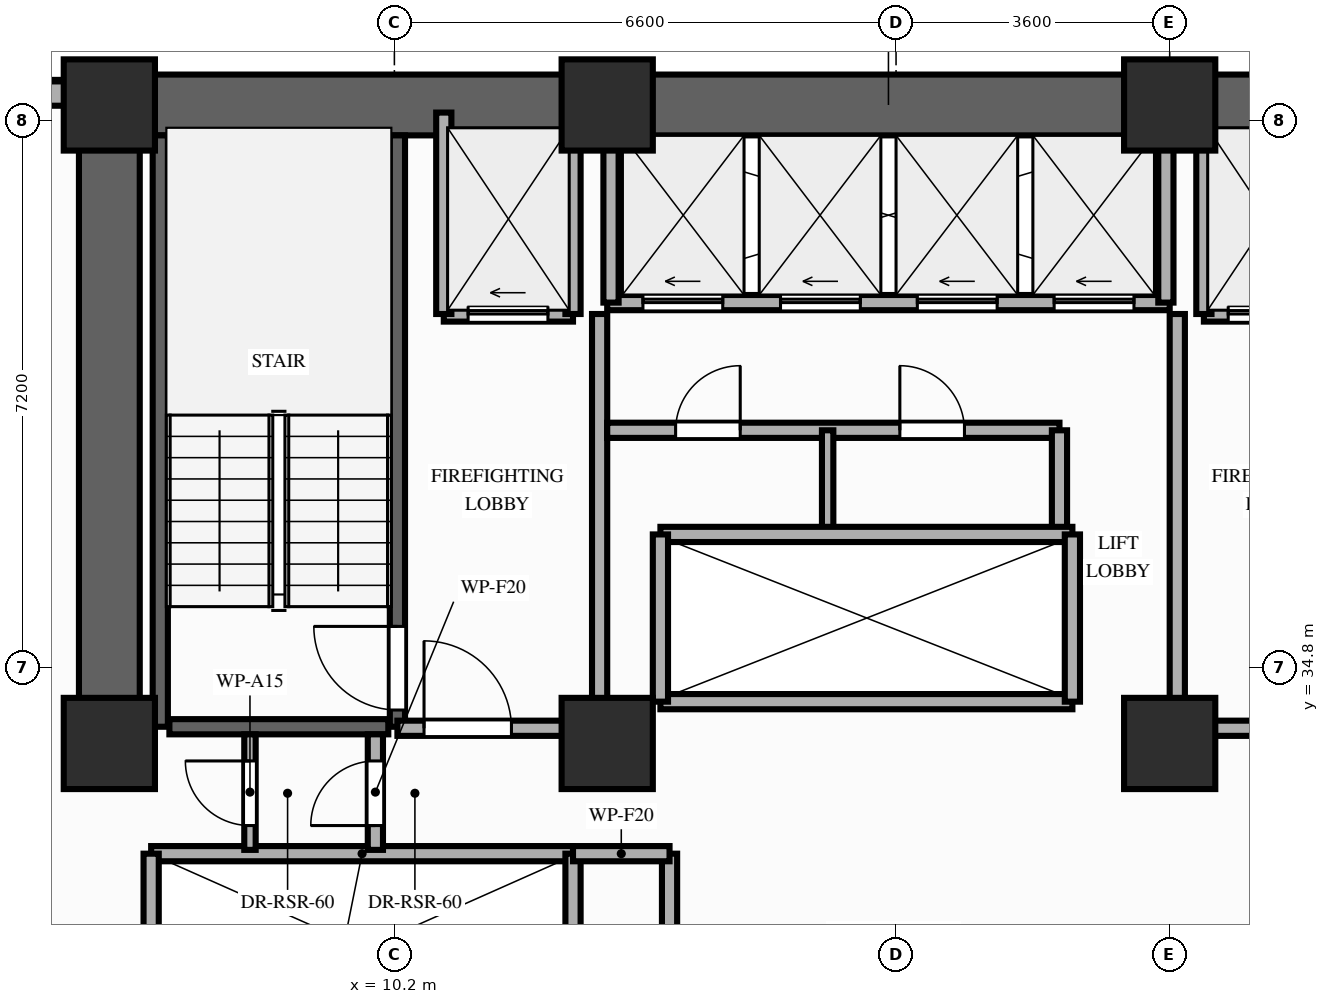
"""IFC4 building model, lengths in metres.
Left out: names, types, materials, properties, quantities, classifications, styles, units other than length and angle.
Written with IfcOpenShell. Run it as: python <this file> out.ifc"""

import sys

from ifc_helpers import new_model, si_unit, direction, frame, frame_2d, origin, origin_2d, place, context, subcontext, project, spatial, rectangle, extrude, element, fill, save


model = new_model("IFC4")
c1 = context("Model", 3, precision=1e-05, world=origin(), true_north=direction((0.0, 1.0)))
c2 = subcontext(c1, "Body", "Model", "MODEL_VIEW")
j1 = project(units=[si_unit("LENGTHUNIT", "METRE"), si_unit("PLANEANGLEUNIT", "RADIAN")], contexts=[c1])
p1 = place(None, origin())
s1 = spatial("IfcSite", under=j1, at=p1, CompositionType="ELEMENT")
p2 = place(p1, origin())
s2 = spatial("IfcBuilding", under=s1, at=p2, CompositionType="ELEMENT")
p3 = place(p2, frame((0.0, 0.0, 72.4)))
s3 = spatial("IfcBuildingStorey", under=s2, at=p3, CompositionType="ELEMENT", Elevation=72.4)
for number, where, z_axis, x_axis in (
    (1, (6.45, 33.8, 0.0), (0.0, 0.0, 1.0), (1.0, 0.0, 0.0)),
    (2, (13.0, 33.8, 0.0), (0.0, 0.0, 1.0), (1.0, 0.0, 0.0)),
    (3, (20.4, 33.8, 0.0), (0.0, 0.0, 1.0), (1.0, 0.0, 0.0)),
    (4, (6.45, 42.2, 0.0), (0.0, 0.0, 1.0), (1.0, 0.0, 0.0)),
    (5, (13.0, 42.2, 0.0), (0.0, 0.0, 1.0), (1.0, 0.0, 0.0)),
    (6, (20.4, 42.2, 0.0), (0.0, 0.0, 1.0), (1.0, 0.0, 0.0)),
):
    element("IfcColumn", number, at=place(p3, frame(where, z_axis=z_axis, x_axis=x_axis)), inside=s3, PredefinedType="COLUMN", context=c2, shape_type="SweptSolid", body=[
        extrude(rectangle(XDim=1.2, YDim=1.2, at=origin_2d()), origin(), (0.0, 0.0, 1.0), 3.2),
    ])
p4 = place(p3, frame((6.0, 42.35, 0.0), z_axis=(0.0, 0.0, 1.0), x_axis=(-1.0, 0.0, 0.0)))
e7 = element("IfcWall", 7, at=p4, inside=s3, PredefinedType="STANDARD", context=c2, shape_type="SweptSolid", body=[
    extrude(rectangle(XDim=2.0, YDim=0.32, at=frame_2d((1.0, 0.0))), origin(), (0.0, 0.0, 1.0), 2.96),
])
p5 = place(p3, frame((6.45, 42.2, 0.0), z_axis=(0.0, 0.0, 1.0), x_axis=(1.0, 0.0, 0.0)))
e8 = element("IfcWall", 8, at=p5, inside=s3, PredefinedType="SHEAR", context=c2, shape_type="SweptSolid", body=[
    extrude(rectangle(XDim=20.45, YDim=0.8, at=frame_2d((10.225, 0.0))), origin(), (0.0, 0.0, 1.0), 2.96),
])
p6 = place(p3, frame((6.45, 33.8, 0.0), z_axis=(0.0, 0.0, 1.0), x_axis=(0.0, 1.0, 0.0)))
e9 = element("IfcWall", 9, at=p6, inside=s3, PredefinedType="SHEAR", context=c2, shape_type="SweptSolid", body=[
    extrude(rectangle(XDim=7.95, YDim=0.8, at=frame_2d((3.975, 0.0))), origin(), (0.0, 0.0, 1.0), 2.96),
])
p7 = place(p3, frame((7.12, 34.02, 0.0), z_axis=(0.0, 0.0, 1.0), x_axis=(0.0, 1.0, 0.0)))
e10 = element("IfcWall", 10, at=p7, inside=s3, PredefinedType="SHEAR", context=c2, shape_type="SweptSolid", body=[
    extrude(rectangle(XDim=7.78, YDim=0.2, at=frame_2d((3.89, 0.0))), origin(), (0.0, 0.0, 1.0), 2.96),
])
p8 = place(p3, frame((10.24, 34.02, 0.0), z_axis=(0.0, 0.0, 1.0), x_axis=(0.0, 1.0, 0.0)))
e11 = element("IfcWall", 11, at=p8, inside=s3, PredefinedType="SHEAR", context=c2, shape_type="SweptSolid", body=[
    extrude(rectangle(XDim=7.78, YDim=0.2, at=frame_2d((3.89, 0.0))), origin(), (0.0, 0.0, 1.0), 2.96),
])
p9 = place(p8, frame((0.22, 0.0, 0.0)))
e12 = element("IfcOpeningElement", 12, at=p9, cuts=e11, PredefinedType="OPENING", context=c2, shape_type="SweptSolid", body=[
    extrude(rectangle(XDim=1.1, YDim=2.15, at=frame_2d((0.55, 1.075))), frame((0.0, 0.11, 0.0), z_axis=(0.0, -1.0, 0.0), x_axis=(1.0, 0.0, 0.0)), (0.0, 0.0, 1.0), 0.22),
])
p10 = place(p3, frame((7.24, 34.02, 0.0), z_axis=(0.0, 0.0, 1.0), x_axis=(1.0, 0.0, 0.0)))
e13 = element("IfcWall", 13, at=p10, inside=s3, PredefinedType="SHEAR", context=c2, shape_type="SweptSolid", body=[
    extrude(rectangle(XDim=2.88, YDim=0.2, at=frame_2d((1.44, 0.0))), origin(), (0.0, 0.0, 1.0), 2.96),
])
p11 = place(p3, frame((7.0, 32.35, 0.0), z_axis=(0.0, 0.0, 1.0), x_axis=(1.0, 0.0, 0.0)))
e14 = element("IfcWall", 14, at=p11, inside=s3, PredefinedType="MOVABLE", context=c2, shape_type="SweptSolid", body=[
    extrude(rectangle(XDim=5.55, YDim=0.2, at=frame_2d((2.775, 0.0))), origin(), (0.0, 0.0, 1.0), 2.96),
])
for number, where, z_axis, x_axis in (
    (15, (7.0, 29.85, 0.0), (0.0, 0.0, 1.0), (0.0, 1.0, 0.0)),
    (16, (12.55, 29.85, 0.0), (0.0, 0.0, 1.0), (0.0, 1.0, 0.0)),
):
    element("IfcWall", number, at=place(p3, frame(where, z_axis=z_axis, x_axis=x_axis)), inside=s3, PredefinedType="MOVABLE", context=c2, shape_type="SweptSolid", body=[
        extrude(rectangle(XDim=2.5, YDim=0.2, at=frame_2d((1.25, 0.0))), origin(), (0.0, 0.0, 1.0), 2.96),
    ])
p12 = place(p3, frame((10.85, 39.45, 0.0), z_axis=(0.0, 0.0, 1.0), x_axis=(1.0, 0.0, 0.0)))
e17 = element("IfcWall", 17, at=p12, inside=s3, PredefinedType="MOVABLE", context=c2, shape_type="SweptSolid", body=[
    extrude(rectangle(XDim=1.7, YDim=0.2, at=frame_2d((0.85, 0.0))), origin(), (0.0, 0.0, 1.0), 2.96),
])
p13 = place(p12, frame((0.32, 0.0, 0.0)))
e18 = element("IfcOpeningElement", 18, at=p13, cuts=e17, PredefinedType="OPENING", context=c2, shape_type="SweptSolid", body=[
    extrude(rectangle(XDim=1.05, YDim=2.15, at=frame_2d((0.525, 1.075))), frame((0.0, 0.11, 0.0), z_axis=(0.0, -1.0, 0.0), x_axis=(1.0, 0.0, 0.0)), (0.0, 0.0, 1.0), 0.22),
])
p14 = place(p3, frame((20.85, 39.45, 0.0), z_axis=(0.0, 0.0, 1.0), x_axis=(1.0, 0.0, 0.0)))
e19 = element("IfcWall", 19, at=p14, inside=s3, PredefinedType="MOVABLE", context=c2, shape_type="SweptSolid", body=[
    extrude(rectangle(XDim=1.7, YDim=0.2, at=frame_2d((0.85, 0.0))), origin(), (0.0, 0.0, 1.0), 2.96),
])
p15 = place(p14, frame((0.32, 0.0, 0.0)))
e20 = element("IfcOpeningElement", 20, at=p15, cuts=e19, PredefinedType="OPENING", context=c2, shape_type="SweptSolid", body=[
    extrude(rectangle(XDim=1.05, YDim=2.15, at=frame_2d((0.525, 1.075))), frame((0.0, 0.11, 0.0), z_axis=(0.0, -1.0, 0.0), x_axis=(1.0, 0.0, 0.0)), (0.0, 0.0, 1.0), 0.22),
])
for number, where, z_axis, x_axis in (
    (21, (10.85, 39.45, 0.0), (0.0, 0.0, 1.0), (0.0, 1.0, 0.0)),
    (22, (12.55, 39.45, 0.0), (0.0, 0.0, 1.0), (0.0, 1.0, 0.0)),
):
    element("IfcWall", number, at=place(p3, frame(where, z_axis=z_axis, x_axis=x_axis)), inside=s3, PredefinedType="MOVABLE", context=c2, shape_type="SweptSolid", body=[
        extrude(rectangle(XDim=2.65, YDim=0.2, at=frame_2d((1.325, 0.0))), origin(), (0.0, 0.0, 1.0), 2.35),
    ])
p16 = place(p3, frame((12.9, 34.0, 0.0), z_axis=(0.0, 0.0, 1.0), x_axis=(0.0, 1.0, 0.0)))
e23 = element("IfcWall", 23, at=p16, inside=s3, PredefinedType="PARTITIONING", context=c2, shape_type="SweptSolid", body=[
    extrude(rectangle(XDim=5.45, YDim=0.2, at=frame_2d((2.725, 0.0))), origin(), (0.0, 0.0, 1.0), 2.35),
])
p17 = place(p3, frame((10.24, 34.0, 0.0), z_axis=(0.0, 0.0, 1.0), x_axis=(1.0, 0.0, 0.0)))
e24 = element("IfcWall", 24, at=p17, inside=s3, PredefinedType="PARTITIONING", context=c2, shape_type="SweptSolid", body=[
    extrude(rectangle(XDim=2.66, YDim=0.2, at=frame_2d((1.33, 0.0))), origin(), (0.0, 0.0, 1.0), 2.35),
])
p18 = place(p17, frame((0.35, 0.0, 0.0)))
e25 = element("IfcOpeningElement", 25, at=p18, cuts=e24, PredefinedType="OPENING", context=c2, shape_type="SweptSolid", body=[
    extrude(rectangle(XDim=1.15, YDim=2.15, at=frame_2d((0.575, 1.075))), frame((0.0, 0.11, 0.0), z_axis=(0.0, -1.0, 0.0), x_axis=(1.0, 0.0, 0.0)), (0.0, 0.0, 1.0), 0.22),
])
p19 = place(p3, frame((20.85, 39.45, 0.0), z_axis=(0.0, 0.0, 1.0), x_axis=(0.0, 1.0, 0.0)))
e26 = element("IfcWall", 26, at=p19, inside=s3, PredefinedType="MOVABLE", context=c2, shape_type="SweptSolid", body=[
    extrude(rectangle(XDim=2.65, YDim=0.2, at=frame_2d((1.325, 0.0))), origin(), (0.0, 0.0, 1.0), 2.35),
])
p20 = place(p3, frame((20.5, 34.0, 0.0), z_axis=(0.0, 0.0, 1.0), x_axis=(0.0, 1.0, 0.0)))
e27 = element("IfcWall", 27, at=p20, inside=s3, PredefinedType="PARTITIONING", context=c2, shape_type="SweptSolid", body=[
    extrude(rectangle(XDim=5.45, YDim=0.2, at=frame_2d((2.725, 0.0))), origin(), (0.0, 0.0, 1.0), 2.35),
])
p21 = place(p3, frame((20.5, 34.0, 0.0), z_axis=(0.0, 0.0, 1.0), x_axis=(1.0, 0.0, 0.0)))
e28 = element("IfcWall", 28, at=p21, inside=s3, PredefinedType="PARTITIONING", context=c2, shape_type="SweptSolid", body=[
    extrude(rectangle(XDim=2.6, YDim=0.2, at=frame_2d((1.3, 0.0))), origin(), (0.0, 0.0, 1.0), 2.35),
])
p22 = place(p21, frame((1.05, 0.0, 0.0)))
e29 = element("IfcOpeningElement", 29, at=p22, cuts=e28, PredefinedType="OPENING", context=c2, shape_type="SweptSolid", body=[
    extrude(rectangle(XDim=1.15, YDim=2.15, at=frame_2d((0.575, 1.075))), frame((0.0, 0.11, 0.0), z_axis=(0.0, -1.0, 0.0), x_axis=(1.0, 0.0, 0.0)), (0.0, 0.0, 1.0), 0.22),
])
p23 = place(p3, frame((9.95, 32.4, 0.0), z_axis=(0.0, 0.0, 1.0), x_axis=(0.0, 1.0, 0.0)))
e30 = element("IfcWall", 30, at=p23, inside=s3, PredefinedType="PARTITIONING", context=c2, shape_type="SweptSolid", body=[
    extrude(rectangle(XDim=1.52, YDim=0.2, at=frame_2d((0.76, 0.0))), origin(), (0.0, 0.0, 1.0), 2.35),
])
p24 = place(p23, frame((0.32, 0.0, 0.0)))
e31 = element("IfcOpeningElement", 31, at=p24, cuts=e30, PredefinedType="OPENING", context=c2, shape_type="SweptSolid", body=[
    extrude(rectangle(XDim=0.85, YDim=2.05, at=frame_2d((0.425, 1.025))), frame((0.0, 0.11, 0.0), z_axis=(0.0, -1.0, 0.0), x_axis=(1.0, 0.0, 0.0)), (0.0, 0.0, 1.0), 0.22),
])
p25 = place(p3, frame((8.3, 32.4, 0.0), z_axis=(0.0, 0.0, 1.0), x_axis=(0.0, 1.0, 0.0)))
e32 = element("IfcWall", 32, at=p25, inside=s3, PredefinedType="PARTITIONING", context=c2, shape_type="SweptSolid", body=[
    extrude(rectangle(XDim=1.52, YDim=0.15, at=frame_2d((0.76, 0.0))), origin(), (0.0, 0.0, 1.0), 2.35),
])
p26 = place(p25, frame((0.32, 0.0, 0.0)))
e33 = element("IfcOpeningElement", 33, at=p26, cuts=e32, PredefinedType="OPENING", context=c2, shape_type="SweptSolid", body=[
    extrude(rectangle(XDim=0.85, YDim=2.05, at=frame_2d((0.425, 1.025))), frame((0.0, 0.085, 0.0), z_axis=(0.0, -1.0, 0.0), x_axis=(1.0, 0.0, 0.0)), (0.0, 0.0, 1.0), 0.17),
])
p27 = place(p3, frame((13.82, 29.85, 0.0), z_axis=(0.0, 0.0, 1.0), x_axis=(0.0, 1.0, 0.0)))
e34 = element("IfcWall", 34, at=p27, inside=s3, PredefinedType="PARTITIONING", context=c2, shape_type="SweptSolid", body=[
    extrude(rectangle(XDim=2.5, YDim=0.2, at=frame_2d((1.25, 0.0))), origin(), (0.0, 0.0, 1.0), 2.96),
])
p28 = place(p3, frame((12.55, 32.35, 0.0), z_axis=(0.0, 0.0, 1.0), x_axis=(1.0, 0.0, 0.0)))
e35 = element("IfcWall", 35, at=p28, inside=s3, PredefinedType="PARTITIONING", context=c2, shape_type="SweptSolid", body=[
    extrude(rectangle(XDim=1.27, YDim=0.2, at=frame_2d((0.635, 0.0))), origin(), (0.0, 0.0, 1.0), 2.96),
])
p29 = place(p3, frame((13.0, 39.6, 0.0), z_axis=(0.0, 0.0, 1.0), x_axis=(1.0, 0.0, 0.0)))
e36 = element("IfcWall", 36, at=p29, inside=s3, PredefinedType="MOVABLE", context=c2, shape_type="SweptSolid", body=[
    extrude(rectangle(XDim=7.4, YDim=0.2, at=frame_2d((3.7, 0.0))), origin(), (0.0, 0.0, 1.0), 2.96),
])
p30 = place(p29, frame((0.47, 0.0, 0.0)))
e37 = element("IfcOpeningElement", 37, at=p30, cuts=e36, PredefinedType="OPENING", context=c2, shape_type="SweptSolid", body=[
    extrude(rectangle(XDim=1.05, YDim=2.15, at=frame_2d((0.525, 1.075))), frame((0.0, 0.11, 0.0), z_axis=(0.0, -1.0, 0.0), x_axis=(1.0, 0.0, 0.0)), (0.0, 0.0, 1.0), 0.22),
])
p31 = place(p29, frame((2.28, 0.0, 0.0)))
e38 = element("IfcOpeningElement", 38, at=p31, cuts=e36, PredefinedType="OPENING", context=c2, shape_type="SweptSolid", body=[
    extrude(rectangle(XDim=1.05, YDim=2.15, at=frame_2d((0.525, 1.075))), frame((0.0, 0.11, 0.0), z_axis=(0.0, -1.0, 0.0), x_axis=(1.0, 0.0, 0.0)), (0.0, 0.0, 1.0), 0.22),
])
p32 = place(p29, frame((4.08, 0.0, 0.0)))
e39 = element("IfcOpeningElement", 39, at=p32, cuts=e36, PredefinedType="OPENING", context=c2, shape_type="SweptSolid", body=[
    extrude(rectangle(XDim=1.05, YDim=2.15, at=frame_2d((0.525, 1.075))), frame((0.0, 0.11, 0.0), z_axis=(0.0, -1.0, 0.0), x_axis=(1.0, 0.0, 0.0)), (0.0, 0.0, 1.0), 0.22),
])
p33 = place(p29, frame((5.88, 0.0, 0.0)))
e40 = element("IfcOpeningElement", 40, at=p33, cuts=e36, PredefinedType="OPENING", context=c2, shape_type="SweptSolid", body=[
    extrude(rectangle(XDim=1.05, YDim=2.15, at=frame_2d((0.525, 1.075))), frame((0.0, 0.11, 0.0), z_axis=(0.0, -1.0, 0.0), x_axis=(1.0, 0.0, 0.0)), (0.0, 0.0, 1.0), 0.22),
])
for number, where, z_axis, x_axis in (
    (41, (13.05, 39.6, 0.0), (0.0, 0.0, 1.0), (0.0, 1.0, 0.0)),
    (42, (20.35, 39.6, 0.0), (0.0, 0.0, 1.0), (0.0, 1.0, 0.0)),
):
    element("IfcWall", number, at=place(p3, frame(where, z_axis=z_axis, x_axis=x_axis)), inside=s3, PredefinedType="MOVABLE", context=c2, shape_type="SweptSolid", body=[
        extrude(rectangle(XDim=2.18, YDim=0.2, at=frame_2d((1.09, 0.0))), origin(), (0.0, 0.0, 1.0), 2.96),
    ])
p34 = place(p3, frame((13.0, 37.92, 0.0), z_axis=(0.0, 0.0, 1.0), x_axis=(1.0, 0.0, 0.0)))
e43 = element("IfcWall", 43, at=p34, inside=s3, PredefinedType="PARTITIONING", context=c2, shape_type="SweptSolid", body=[
    extrude(rectangle(XDim=5.95, YDim=0.2, at=frame_2d((2.975, 0.0))), origin(), (0.0, 0.0, 1.0), 2.96),
])
p35 = place(p34, frame((0.9, 0.0, 0.0)))
e44 = element("IfcOpeningElement", 44, at=p35, cuts=e43, PredefinedType="OPENING", context=c2, shape_type="SweptSolid", body=[
    extrude(rectangle(XDim=0.85, YDim=2.05, at=frame_2d((0.425, 1.025))), frame((0.0, 0.11, 0.0), z_axis=(0.0, -1.0, 0.0), x_axis=(1.0, 0.0, 0.0)), (0.0, 0.0, 1.0), 0.22),
])
p36 = place(p34, frame((3.85, 0.0, 0.0)))
e45 = element("IfcOpeningElement", 45, at=p36, cuts=e43, PredefinedType="OPENING", context=c2, shape_type="SweptSolid", body=[
    extrude(rectangle(XDim=0.85, YDim=2.05, at=frame_2d((0.425, 1.025))), frame((0.0, 0.11, 0.0), z_axis=(0.0, -1.0, 0.0), x_axis=(1.0, 0.0, 0.0)), (0.0, 0.0, 1.0), 0.22),
])
p37 = place(p3, frame((18.95, 36.6, 0.0), z_axis=(0.0, 0.0, 1.0), x_axis=(0.0, 1.0, 0.0)))
e46 = element("IfcWall", 46, at=p37, inside=s3, PredefinedType="PARTITIONING", context=c2, shape_type="SweptSolid", body=[
    extrude(rectangle(XDim=1.32, YDim=0.2, at=frame_2d((0.66, 0.0))), origin(), (0.0, 0.0, 1.0), 2.96),
])
p38 = place(p3, frame((15.9, 36.6, 0.0), z_axis=(0.0, 0.0, 1.0), x_axis=(0.0, 1.0, 0.0)))
e47 = element("IfcWall", 47, at=p38, inside=s3, PredefinedType="PARTITIONING", context=c2, shape_type="SweptSolid", body=[
    extrude(rectangle(XDim=1.32, YDim=0.15, at=frame_2d((0.66, 0.0))), origin(), (0.0, 0.0, 1.0), 2.96),
])
for number, where, z_axis, x_axis in (
    (48, (13.7, 34.35, 0.0), (0.0, 0.0, 1.0), (1.0, 0.0, 0.0)),
    (49, (13.7, 36.55, 0.0), (0.0, 0.0, 1.0), (1.0, 0.0, 0.0)),
):
    element("IfcWall", number, at=place(p3, frame(where, z_axis=z_axis, x_axis=x_axis)), inside=s3, PredefinedType="MOVABLE", context=c2, shape_type="SweptSolid", body=[
        extrude(rectangle(XDim=5.42, YDim=0.2, at=frame_2d((2.71, 0.0))), origin(), (0.0, 0.0, 1.0), 2.96),
    ])
for number, where, z_axis, x_axis in (
    (50, (13.7, 34.35, 0.0), (0.0, 0.0, 1.0), (0.0, 1.0, 0.0)),
    (51, (19.12, 34.35, 0.0), (0.0, 0.0, 1.0), (0.0, 1.0, 0.0)),
):
    element("IfcWall", number, at=place(p3, frame(where, z_axis=z_axis, x_axis=x_axis)), inside=s3, PredefinedType="MOVABLE", context=c2, shape_type="SweptSolid", body=[
        extrude(rectangle(XDim=2.2, YDim=0.2, at=frame_2d((1.1, 0.0))), origin(), (0.0, 0.0, 1.0), 2.96),
    ])
p39 = place(p9, origin())
e52 = element("IfcDoor", 52, at=p39, inside=s3, OperationType="SINGLE_SWING_RIGHT", PredefinedType="DOOR", context=c2, shape_type="SweptSolid", body=[
    extrude(rectangle(XDim=1.1, YDim=2.15, at=frame_2d((0.55, 1.075))), frame((0.0, 0.025, 0.0), z_axis=(0.0, -1.0, 0.0), x_axis=(1.0, 0.0, 0.0)), (0.0, 0.0, 1.0), 0.05),
])
fill(e12, e52)
p40 = place(p13, origin())
e53 = element("IfcDoor", 53, at=p40, inside=s3, OperationType="SLIDING_TO_LEFT", PredefinedType="DOOR", context=c2, shape_type="SweptSolid", body=[
    extrude(rectangle(XDim=1.05, YDim=2.15, at=frame_2d((0.525, 1.075))), frame((0.0, 0.025, 0.0), z_axis=(0.0, -1.0, 0.0), x_axis=(1.0, 0.0, 0.0)), (0.0, 0.0, 1.0), 0.05),
])
fill(e18, e53)
p41 = place(p15, origin())
e54 = element("IfcDoor", 54, at=p41, inside=s3, OperationType="SLIDING_TO_LEFT", PredefinedType="DOOR", context=c2, shape_type="SweptSolid", body=[
    extrude(rectangle(XDim=1.05, YDim=2.15, at=frame_2d((0.525, 1.075))), frame((0.0, 0.025, 0.0), z_axis=(0.0, -1.0, 0.0), x_axis=(1.0, 0.0, 0.0)), (0.0, 0.0, 1.0), 0.05),
])
fill(e20, e54)
p42 = place(p18, origin())
e55 = element("IfcDoor", 55, at=p42, inside=s3, OperationType="SINGLE_SWING_LEFT", PredefinedType="DOOR", context=c2, shape_type="SweptSolid", body=[
    extrude(rectangle(XDim=1.15, YDim=2.15, at=frame_2d((0.575, 1.075))), frame((0.0, 0.025, 0.0), z_axis=(0.0, -1.0, 0.0), x_axis=(1.0, 0.0, 0.0)), (0.0, 0.0, 1.0), 0.05),
])
fill(e25, e55)
p43 = place(p24, origin())
e56 = element("IfcDoor", 56, at=p43, inside=s3, OperationType="SINGLE_SWING_LEFT", PredefinedType="DOOR", context=c2, shape_type="SweptSolid", body=[
    extrude(rectangle(XDim=0.85, YDim=2.05, at=frame_2d((0.425, 1.025))), frame((0.0, 0.025, 0.0), z_axis=(0.0, -1.0, 0.0), x_axis=(1.0, 0.0, 0.0)), (0.0, 0.0, 1.0), 0.05),
])
fill(e31, e56)
p44 = place(p26, origin())
e57 = element("IfcDoor", 57, at=p44, inside=s3, OperationType="SINGLE_SWING_RIGHT", PredefinedType="DOOR", context=c2, shape_type="SweptSolid", body=[
    extrude(rectangle(XDim=0.85, YDim=2.05, at=frame_2d((0.425, 1.025))), frame((0.0, 0.025, 0.0), z_axis=(0.0, -1.0, 0.0), x_axis=(1.0, 0.0, 0.0)), (0.0, 0.0, 1.0), 0.05),
])
fill(e33, e57)
p45 = place(p30, origin())
e58 = element("IfcDoor", 58, at=p45, inside=s3, OperationType="SLIDING_TO_LEFT", PredefinedType="DOOR", context=c2, shape_type="SweptSolid", body=[
    extrude(rectangle(XDim=1.05, YDim=2.15, at=frame_2d((0.525, 1.075))), frame((0.0, 0.025, 0.0), z_axis=(0.0, -1.0, 0.0), x_axis=(1.0, 0.0, 0.0)), (0.0, 0.0, 1.0), 0.05),
])
fill(e37, e58)
p46 = place(p31, origin())
e59 = element("IfcDoor", 59, at=p46, inside=s3, OperationType="SLIDING_TO_LEFT", PredefinedType="DOOR", context=c2, shape_type="SweptSolid", body=[
    extrude(rectangle(XDim=1.05, YDim=2.15, at=frame_2d((0.525, 1.075))), frame((0.0, 0.025, 0.0), z_axis=(0.0, -1.0, 0.0), x_axis=(1.0, 0.0, 0.0)), (0.0, 0.0, 1.0), 0.05),
])
fill(e38, e59)
p47 = place(p32, origin())
e60 = element("IfcDoor", 60, at=p47, inside=s3, OperationType="SLIDING_TO_LEFT", PredefinedType="DOOR", context=c2, shape_type="SweptSolid", body=[
    extrude(rectangle(XDim=1.05, YDim=2.15, at=frame_2d((0.525, 1.075))), frame((0.0, 0.025, 0.0), z_axis=(0.0, -1.0, 0.0), x_axis=(1.0, 0.0, 0.0)), (0.0, 0.0, 1.0), 0.05),
])
fill(e39, e60)
p48 = place(p33, origin())
e61 = element("IfcDoor", 61, at=p48, inside=s3, OperationType="SLIDING_TO_LEFT", PredefinedType="DOOR", context=c2, shape_type="SweptSolid", body=[
    extrude(rectangle(XDim=1.05, YDim=2.15, at=frame_2d((0.525, 1.075))), frame((0.0, 0.025, 0.0), z_axis=(0.0, -1.0, 0.0), x_axis=(1.0, 0.0, 0.0)), (0.0, 0.0, 1.0), 0.05),
])
fill(e40, e61)
p49 = place(p35, origin())
e62 = element("IfcDoor", 62, at=p49, inside=s3, OperationType="SINGLE_SWING_RIGHT", PredefinedType="DOOR", context=c2, shape_type="SweptSolid", body=[
    extrude(rectangle(XDim=0.85, YDim=2.05, at=frame_2d((0.425, 1.025))), frame((0.0, 0.025, 0.0), z_axis=(0.0, -1.0, 0.0), x_axis=(1.0, 0.0, 0.0)), (0.0, 0.0, 1.0), 0.05),
])
fill(e44, e62)
p50 = place(p36, origin())
e63 = element("IfcDoor", 63, at=p50, inside=s3, OperationType="SINGLE_SWING_LEFT", PredefinedType="DOOR", context=c2, shape_type="SweptSolid", body=[
    extrude(rectangle(XDim=0.85, YDim=2.05, at=frame_2d((0.425, 1.025))), frame((0.0, 0.025, 0.0), z_axis=(0.0, -1.0, 0.0), x_axis=(1.0, 0.0, 0.0)), (0.0, 0.0, 1.0), 0.05),
])
fill(e45, e63)
save(model, sys.argv[1])
